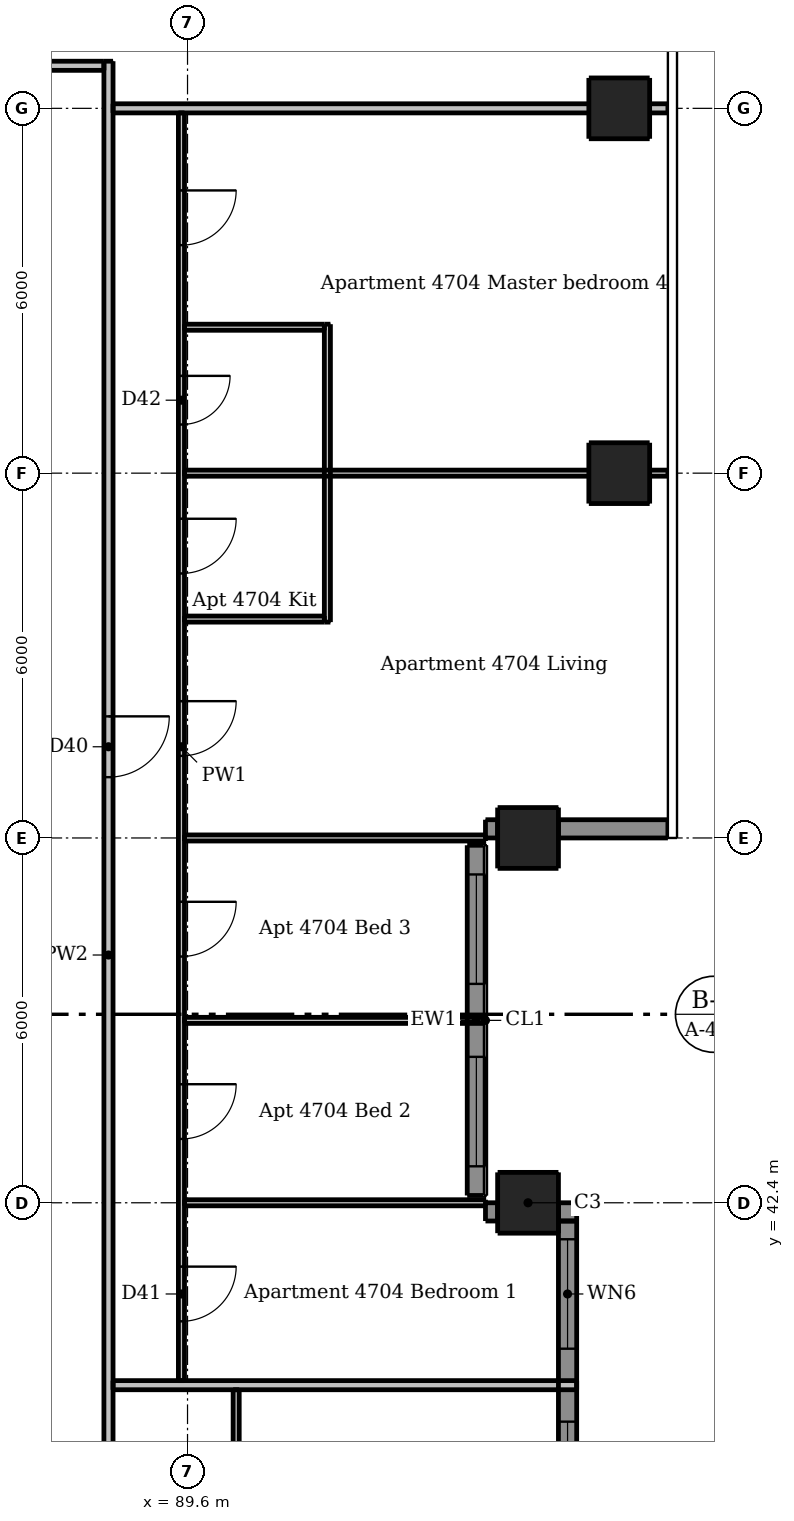
"""IFC4 building model, lengths in metres.
Left out: names, types, materials, properties, quantities, classifications, styles, units other than length and angle.
Written with IfcOpenShell. Run it as: python <this file> out.ifc"""

import sys

from ifc_helpers import new_model, si_unit, direction, frame, frame_2d, origin, origin_2d, place, context, subcontext, project, spatial, rectangle, extrude, element, fill, save


model = new_model("IFC4")
c1 = context("Model", 3, precision=1e-05, world=origin(), true_north=direction((0.0, 1.0)))
c2 = subcontext(c1, "Body", "Model", "MODEL_VIEW")
j1 = project(units=[si_unit("LENGTHUNIT", "METRE"), si_unit("PLANEANGLEUNIT", "RADIAN")], contexts=[c1])
p1 = place(None, origin())
s1 = spatial("IfcSite", under=j1, at=p1, CompositionType="ELEMENT")
p2 = place(p1, origin())
s2 = spatial("IfcBuilding", under=s1, at=p2, CompositionType="ELEMENT")
p3 = place(p2, frame((0.0, 0.0, 174.7)))
s3 = spatial("IfcBuildingStorey", under=s2, at=p3, CompositionType="ELEMENT", Elevation=174.7)
for number, where, z_axis, x_axis in (
    (1, (95.2, 42.4, 0.0), (0.0, 0.0, 1.0), (1.0, 0.0, 0.0)),
    (2, (95.2, 48.4, 0.0), (0.0, 0.0, 1.0), (1.0, 0.0, 0.0)),
    (3, (96.7, 54.4, 0.0), (0.0, 0.0, 1.0), (1.0, 0.0, 0.0)),
    (4, (96.7, 60.4, 0.0), (0.0, 0.0, 1.0), (1.0, 0.0, 0.0)),
):
    element("IfcColumn", number, at=place(p3, frame(where, z_axis=z_axis, x_axis=x_axis)), inside=s3, PredefinedType="COLUMN", context=c2, shape_type="SweptSolid", body=[
        extrude(rectangle(XDim=1.0, YDim=1.0, at=origin_2d()), origin(), (0.0, 0.0, 1.0), 2.95),
    ])
p4 = place(p3, frame((96.0, 42.25, 0.0), z_axis=(0.0, 0.0, 1.0), x_axis=(-1.0, 0.0, 0.0)))
e5 = element("IfcWall", 5, at=p4, inside=s3, PredefinedType="SOLIDWALL", context=c2, shape_type="SweptSolid", body=[
    extrude(rectangle(XDim=0.3, YDim=0.3, at=frame_2d((0.15, 0.0))), origin(), (0.0, 0.0, 1.0), 2.95),
])
for number, where, z_axis, x_axis in (
    (6, (94.7, 42.25, 0.0), (0.0, 0.0, 1.0), (-1.0, 0.0, 0.0)),
    (7, (94.5, 48.55, 0.0), (0.0, 0.0, 1.0), (1.0, 0.0, 0.0)),
):
    element("IfcWall", number, at=place(p3, frame(where, z_axis=z_axis, x_axis=x_axis)), inside=s3, PredefinedType="SOLIDWALL", context=c2, shape_type="SweptSolid", body=[
        extrude(rectangle(XDim=0.2, YDim=0.3, at=frame_2d((0.1, 0.0))), origin(), (0.0, 0.0, 1.0), 2.95),
    ])
p5 = place(p3, frame((95.7, 48.55, 0.0), z_axis=(0.0, 0.0, 1.0), x_axis=(1.0, 0.0, 0.0)))
e8 = element("IfcWall", 8, at=p5, inside=s3, PredefinedType="SOLIDWALL", context=c2, shape_type="SweptSolid", body=[
    extrude(rectangle(XDim=1.8, YDim=0.3, at=frame_2d((0.9, 0.0))), origin(), (0.0, 0.0, 1.0), 2.95),
])
p6 = place(p3, frame((95.85, 36.4, 0.0), z_axis=(0.0, 0.0, 1.0), x_axis=(0.0, 1.0, 0.0)))
e9 = element("IfcWall", 9, at=p6, inside=s3, PredefinedType="SOLIDWALL", context=c2, shape_type="SweptSolid", body=[
    extrude(rectangle(XDim=5.7, YDim=0.3, at=frame_2d((2.85, 0.0))), origin(), (0.0, 0.0, 1.0), 2.34),
])
p7 = place(p6, frame((0.6, 0.0, 0.15)))
e10 = element("IfcOpeningElement", 10, at=p7, cuts=e9, PredefinedType="OPENING", context=c2, shape_type="SweptSolid", body=[
    extrude(rectangle(XDim=1.8, YDim=2.1, at=frame_2d((0.9, 1.05))), frame((0.0, 0.16, 0.0), z_axis=(0.0, -1.0, 0.0), x_axis=(1.0, 0.0, 0.0)), (0.0, 0.0, 1.0), 0.32),
])
p8 = place(p6, frame((3.6, 0.0, 0.15)))
e11 = element("IfcOpeningElement", 11, at=p8, cuts=e9, PredefinedType="OPENING", context=c2, shape_type="SweptSolid", body=[
    extrude(rectangle(XDim=1.8, YDim=2.1, at=frame_2d((0.9, 1.05))), frame((0.0, 0.16, 0.0), z_axis=(0.0, -1.0, 0.0), x_axis=(1.0, 0.0, 0.0)), (0.0, 0.0, 1.0), 0.32),
])
p9 = place(p3, frame((94.35, 42.52, 0.0), z_axis=(0.0, 0.0, 1.0), x_axis=(0.0, 1.0, 0.0)))
e12 = element("IfcWall", 12, at=p9, inside=s3, PredefinedType="SOLIDWALL", context=c2, shape_type="SweptSolid", body=[
    extrude(rectangle(XDim=5.76, YDim=0.3, at=frame_2d((2.88, 0.0))), origin(), (0.0, 0.0, 1.0), 2.95),
])
p10 = place(p9, frame((0.48, 0.0, 0.15)))
e13 = element("IfcOpeningElement", 13, at=p10, cuts=e12, PredefinedType="OPENING", context=c2, shape_type="SweptSolid", body=[
    extrude(rectangle(XDim=1.8, YDim=2.1, at=frame_2d((0.9, 1.05))), frame((0.0, 0.16, 0.0), z_axis=(0.0, -1.0, 0.0), x_axis=(1.0, 0.0, 0.0)), (0.0, 0.0, 1.0), 0.32),
])
p11 = place(p9, frame((3.48, 0.0, 0.15)))
e14 = element("IfcOpeningElement", 14, at=p11, cuts=e12, PredefinedType="OPENING", context=c2, shape_type="SweptSolid", body=[
    extrude(rectangle(XDim=1.8, YDim=2.1, at=frame_2d((0.9, 1.05))), frame((0.0, 0.16, 0.0), z_axis=(0.0, -1.0, 0.0), x_axis=(1.0, 0.0, 0.0)), (0.0, 0.0, 1.0), 0.32),
])
p12 = place(p3, frame((89.5, 60.325, 0.0), z_axis=(0.0, 0.0, 1.0), x_axis=(0.0, -1.0, 0.0)))
e15 = element("IfcWall", 15, at=p12, inside=s3, PredefinedType="PARTITIONING", context=c2, shape_type="SweptSolid", body=[
    extrude(rectangle(XDim=20.85, YDim=0.1, at=frame_2d((10.425, 0.0))), origin(), (0.0, 0.0, 1.0), 2.332),
])
p13 = place(p12, frame((9.675, 0.0, 0.0)))
e16 = element("IfcOpeningElement", 16, at=p13, cuts=e15, PredefinedType="OPENING", context=c2, shape_type="SweptSolid", body=[
    extrude(rectangle(XDim=0.9, YDim=2.1, at=frame_2d((0.45, 1.05))), frame((0.0, 0.06, 0.0), z_axis=(0.0, -1.0, 0.0), x_axis=(1.0, 0.0, 0.0)), (0.0, 0.0, 1.0), 0.12),
])
p14 = place(p12, frame((6.675, 0.0, 0.0)))
e17 = element("IfcOpeningElement", 17, at=p14, cuts=e15, PredefinedType="OPENING", context=c2, shape_type="SweptSolid", body=[
    extrude(rectangle(XDim=0.9, YDim=2.1, at=frame_2d((0.45, 1.05))), frame((0.0, 0.06, 0.0), z_axis=(0.0, -1.0, 0.0), x_axis=(1.0, 0.0, 0.0)), (0.0, 0.0, 1.0), 0.12),
])
p15 = place(p12, frame((18.975, 0.0, 0.0)))
e18 = element("IfcOpeningElement", 18, at=p15, cuts=e15, PredefinedType="OPENING", context=c2, shape_type="SweptSolid", body=[
    extrude(rectangle(XDim=0.9, YDim=2.1, at=frame_2d((0.45, 1.05))), frame((0.0, 0.06, 0.0), z_axis=(0.0, -1.0, 0.0), x_axis=(1.0, 0.0, 0.0)), (0.0, 0.0, 1.0), 0.12),
])
p16 = place(p12, frame((15.975, 0.0, 0.0)))
e19 = element("IfcOpeningElement", 19, at=p16, cuts=e15, PredefinedType="OPENING", context=c2, shape_type="SweptSolid", body=[
    extrude(rectangle(XDim=0.9, YDim=2.1, at=frame_2d((0.45, 1.05))), frame((0.0, 0.06, 0.0), z_axis=(0.0, -1.0, 0.0), x_axis=(1.0, 0.0, 0.0)), (0.0, 0.0, 1.0), 0.12),
])
p17 = place(p12, frame((12.975, 0.0, 0.0)))
e20 = element("IfcOpeningElement", 20, at=p17, cuts=e15, PredefinedType="OPENING", context=c2, shape_type="SweptSolid", body=[
    extrude(rectangle(XDim=0.9, YDim=2.1, at=frame_2d((0.45, 1.05))), frame((0.0, 0.06, 0.0), z_axis=(0.0, -1.0, 0.0), x_axis=(1.0, 0.0, 0.0)), (0.0, 0.0, 1.0), 0.12),
])
p18 = place(p12, frame((1.275, 0.0, 0.0)))
e21 = element("IfcOpeningElement", 21, at=p18, cuts=e15, PredefinedType="OPENING", context=c2, shape_type="SweptSolid", body=[
    extrude(rectangle(XDim=0.9, YDim=2.1, at=frame_2d((0.45, 1.05))), frame((0.0, 0.06, 0.0), z_axis=(0.0, -1.0, 0.0), x_axis=(1.0, 0.0, 0.0)), (0.0, 0.0, 1.0), 0.12),
])
p19 = place(p12, frame((4.325, 0.0, 0.0)))
e22 = element("IfcOpeningElement", 22, at=p19, cuts=e15, PredefinedType="OPENING", context=c2, shape_type="SweptSolid", body=[
    extrude(rectangle(XDim=0.8, YDim=2.1, at=frame_2d((0.4, 1.05))), frame((0.0, 0.06, 0.0), z_axis=(0.0, -1.0, 0.0), x_axis=(1.0, 0.0, 0.0)), (0.0, 0.0, 1.0), 0.12),
])
p20 = place(p3, frame((90.4, 33.45, 0.0), z_axis=(0.0, 0.0, 1.0), x_axis=(0.0, 1.0, 0.0)))
e23 = element("IfcWall", 23, at=p20, inside=s3, PredefinedType="PARTITIONING", context=c2, shape_type="SweptSolid", body=[
    extrude(rectangle(XDim=5.875, YDim=0.1, at=frame_2d((2.938, 0.0))), origin(), (0.0, 0.0, 1.0), 2.95),
])
p21 = place(p20, frame((3.75, 0.0, 0.0)))
e24 = element("IfcOpeningElement", 24, at=p21, cuts=e23, PredefinedType="OPENING", context=c2, shape_type="SweptSolid", body=[
    extrude(rectangle(XDim=0.8, YDim=2.1, at=frame_2d((0.4, 1.05))), frame((0.0, 0.06, 0.0), z_axis=(0.0, -1.0, 0.0), x_axis=(1.0, 0.0, 0.0)), (0.0, 0.0, 1.0), 0.12),
])
p22 = place(p3, frame((91.9, 51.95, 0.0), z_axis=(0.0, 0.0, 1.0), x_axis=(0.0, 1.0, 0.0)))
e25 = element("IfcWall", 25, at=p22, inside=s3, PredefinedType="PARTITIONING", context=c2, shape_type="SweptSolid", body=[
    extrude(rectangle(XDim=4.9, YDim=0.1, at=frame_2d((2.45, 0.0))), origin(), (0.0, 0.0, 1.0), 2.95),
])
p23 = place(p3, frame((89.55, 56.8, 0.0), z_axis=(0.0, 0.0, 1.0), x_axis=(1.0, 0.0, 0.0)))
e26 = element("IfcWall", 26, at=p23, inside=s3, PredefinedType="PARTITIONING", context=c2, shape_type="SweptSolid", body=[
    extrude(rectangle(XDim=2.3, YDim=0.1, at=frame_2d((1.15, 0.0))), origin(), (0.0, 0.0, 1.0), 2.95),
])
p24 = place(p3, frame((89.55, 54.4, 0.0), z_axis=(0.0, 0.0, 1.0), x_axis=(1.0, 0.0, 0.0)))
e27 = element("IfcWall", 27, at=p24, inside=s3, PredefinedType="PARTITIONING", context=c2, shape_type="SweptSolid", body=[
    extrude(rectangle(XDim=7.95, YDim=0.1, at=frame_2d((3.975, 0.0))), origin(), (0.0, 0.0, 1.0), 2.332),
])
p25 = place(p3, frame((89.55, 52.0, 0.0), z_axis=(0.0, 0.0, 1.0), x_axis=(1.0, 0.0, 0.0)))
e28 = element("IfcWall", 28, at=p25, inside=s3, PredefinedType="PARTITIONING", context=c2, shape_type="SweptSolid", body=[
    extrude(rectangle(XDim=2.3, YDim=0.1, at=frame_2d((1.15, 0.0))), origin(), (0.0, 0.0, 1.0), 2.95),
])
p26 = place(p3, frame((89.55, 48.4, 0.0), z_axis=(0.0, 0.0, 1.0), x_axis=(1.0, 0.0, 0.0)))
e29 = element("IfcWall", 29, at=p26, inside=s3, PredefinedType="PARTITIONING", context=c2, shape_type="SweptSolid", body=[
    extrude(rectangle(XDim=4.95, YDim=0.1, at=frame_2d((2.475, 0.0))), origin(), (0.0, 0.0, 1.0), 2.332),
])
p27 = place(p3, frame((89.55, 45.4, 0.0), z_axis=(0.0, 0.0, 1.0), x_axis=(1.0, 0.0, 0.0)))
e30 = element("IfcWall", 30, at=p27, inside=s3, PredefinedType="PARTITIONING", context=c2, shape_type="SweptSolid", body=[
    extrude(rectangle(XDim=4.95, YDim=0.1, at=frame_2d((2.475, 0.0))), origin(), (0.0, 0.0, 1.0), 2.95),
])
p28 = place(p3, frame((89.55, 42.4, 0.0), z_axis=(0.0, 0.0, 1.0), x_axis=(1.0, 0.0, 0.0)))
e31 = element("IfcWall", 31, at=p28, inside=s3, PredefinedType="PARTITIONING", context=c2, shape_type="SweptSolid", body=[
    extrude(rectangle(XDim=4.95, YDim=0.1, at=frame_2d((2.475, 0.0))), origin(), (0.0, 0.0, 1.0), 2.332),
])
p29 = place(p3, frame((88.3, 61.175, 0.0), z_axis=(0.0, 0.0, 1.0), x_axis=(0.0, -1.0, 0.0)))
e32 = element("IfcWall", 32, at=p29, inside=s3, PredefinedType="PARTITIONING", context=c2, shape_type="SweptSolid", body=[
    extrude(rectangle(XDim=29.4, YDim=0.15, at=frame_2d((14.7, 0.0))), origin(), (0.0, 0.0, 1.0), 2.95),
])
p30 = place(p29, frame((28.125, 0.0, 0.0)))
e33 = element("IfcOpeningElement", 33, at=p30, cuts=e32, PredefinedType="OPENING", context=c2, shape_type="SweptSolid", body=[
    extrude(rectangle(XDim=1.0, YDim=2.1, at=frame_2d((0.5, 1.05))), frame((0.0, 0.085, 0.0), z_axis=(0.0, -1.0, 0.0), x_axis=(1.0, 0.0, 0.0)), (0.0, 0.0, 1.0), 0.17),
])
p31 = place(p29, frame((10.775, 0.0, 0.0)))
e34 = element("IfcOpeningElement", 34, at=p31, cuts=e32, PredefinedType="OPENING", context=c2, shape_type="SweptSolid", body=[
    extrude(rectangle(XDim=1.0, YDim=2.1, at=frame_2d((0.5, 1.05))), frame((0.0, 0.085, 0.0), z_axis=(0.0, -1.0, 0.0), x_axis=(1.0, 0.0, 0.0)), (0.0, 0.0, 1.0), 0.17),
])
p32 = place(p3, frame((58.975, 61.1, 0.0), z_axis=(0.0, 0.0, 1.0), x_axis=(1.0, 0.0, 0.0)))
e35 = element("IfcWall", 35, at=p32, inside=s3, PredefinedType="PARTITIONING", context=c2, shape_type="SweptSolid", body=[
    extrude(rectangle(XDim=29.25, YDim=0.15, at=frame_2d((14.625, 0.0))), origin(), (0.0, 0.0, 1.0), 2.95),
])
p33 = place(p32, frame((9.125, 0.0, 0.0)))
e36 = element("IfcOpeningElement", 36, at=p33, cuts=e35, PredefinedType="OPENING", context=c2, shape_type="SweptSolid", body=[
    extrude(rectangle(XDim=1.0, YDim=2.1, at=frame_2d((0.5, 1.05))), frame((0.0, 0.085, 0.0), z_axis=(0.0, -1.0, 0.0), x_axis=(1.0, 0.0, 0.0)), (0.0, 0.0, 1.0), 0.17),
])
p34 = place(p32, frame((26.475, 0.0, 0.0)))
e37 = element("IfcOpeningElement", 37, at=p34, cuts=e35, PredefinedType="OPENING", context=c2, shape_type="SweptSolid", body=[
    extrude(rectangle(XDim=1.0, YDim=2.1, at=frame_2d((0.5, 1.05))), frame((0.0, 0.085, 0.0), z_axis=(0.0, -1.0, 0.0), x_axis=(1.0, 0.0, 0.0)), (0.0, 0.0, 1.0), 0.17),
])
p35 = place(p3, frame((88.375, 60.4, 0.0), z_axis=(0.0, 0.0, 1.0), x_axis=(1.0, 0.0, 0.0)))
e38 = element("IfcWall", 38, at=p35, inside=s3, PredefinedType="PARTITIONING", context=c2, shape_type="SweptSolid", body=[
    extrude(rectangle(XDim=9.125, YDim=0.15, at=frame_2d((4.562, 0.0))), origin(), (0.0, 0.0, 1.0), 2.332),
])
p36 = place(p3, frame((88.375, 39.4, 0.0), z_axis=(0.0, 0.0, 1.0), x_axis=(1.0, 0.0, 0.0)))
e39 = element("IfcWall", 39, at=p36, inside=s3, PredefinedType="PARTITIONING", context=c2, shape_type="SweptSolid", body=[
    extrude(rectangle(XDim=7.625, YDim=0.15, at=frame_2d((3.812, 0.0))), origin(), (0.0, 0.0, 1.0), 2.95),
])
p37 = place(p7, origin())
e40 = element("IfcWindow", 40, at=p37, inside=s3, PartitioningType="DOUBLE_PANEL_VERTICAL", PredefinedType="WINDOW", context=c2, shape_type="SweptSolid", body=[
    extrude(rectangle(XDim=1.8, YDim=2.1, at=frame_2d((0.9, 1.05))), frame((0.0, 0.03, 0.0), z_axis=(0.0, -1.0, 0.0), x_axis=(1.0, 0.0, 0.0)), (0.0, 0.0, 1.0), 0.06),
])
fill(e10, e40)
p38 = place(p8, origin())
e41 = element("IfcWindow", 41, at=p38, inside=s3, PartitioningType="DOUBLE_PANEL_VERTICAL", PredefinedType="WINDOW", context=c2, shape_type="SweptSolid", body=[
    extrude(rectangle(XDim=1.8, YDim=2.1, at=frame_2d((0.9, 1.05))), frame((0.0, 0.03, 0.0), z_axis=(0.0, -1.0, 0.0), x_axis=(1.0, 0.0, 0.0)), (0.0, 0.0, 1.0), 0.06),
])
fill(e11, e41)
p39 = place(p10, origin())
e42 = element("IfcWindow", 42, at=p39, inside=s3, PartitioningType="DOUBLE_PANEL_VERTICAL", PredefinedType="WINDOW", context=c2, shape_type="SweptSolid", body=[
    extrude(rectangle(XDim=1.8, YDim=2.1, at=frame_2d((0.9, 1.05))), frame((0.0, 0.03, 0.0), z_axis=(0.0, -1.0, 0.0), x_axis=(1.0, 0.0, 0.0)), (0.0, 0.0, 1.0), 0.06),
])
fill(e13, e42)
p40 = place(p11, origin())
e43 = element("IfcWindow", 43, at=p40, inside=s3, PartitioningType="DOUBLE_PANEL_VERTICAL", PredefinedType="WINDOW", context=c2, shape_type="SweptSolid", body=[
    extrude(rectangle(XDim=1.8, YDim=2.1, at=frame_2d((0.9, 1.05))), frame((0.0, 0.03, 0.0), z_axis=(0.0, -1.0, 0.0), x_axis=(1.0, 0.0, 0.0)), (0.0, 0.0, 1.0), 0.06),
])
fill(e14, e43)
p41 = place(p31, origin())
e44 = element("IfcDoor", 44, at=p41, inside=s3, OperationType="SINGLE_SWING_LEFT", PredefinedType="DOOR", context=c2, shape_type="SweptSolid", body=[
    extrude(rectangle(XDim=1.0, YDim=2.1, at=frame_2d((0.5, 1.05))), frame((0.0, 0.025, 0.0), z_axis=(0.0, -1.0, 0.0), x_axis=(1.0, 0.0, 0.0)), (0.0, 0.0, 1.0), 0.05),
])
fill(e34, e44)
p42 = place(p13, origin())
e45 = element("IfcDoor", 45, at=p42, inside=s3, OperationType="SINGLE_SWING_LEFT", PredefinedType="DOOR", context=c2, shape_type="SweptSolid", body=[
    extrude(rectangle(XDim=0.9, YDim=2.1, at=frame_2d((0.45, 1.05))), frame((0.0, 0.025, 0.0), z_axis=(0.0, -1.0, 0.0), x_axis=(1.0, 0.0, 0.0)), (0.0, 0.0, 1.0), 0.05),
])
fill(e16, e45)
p43 = place(p14, origin())
e46 = element("IfcDoor", 46, at=p43, inside=s3, OperationType="SINGLE_SWING_LEFT", PredefinedType="DOOR", context=c2, shape_type="SweptSolid", body=[
    extrude(rectangle(XDim=0.9, YDim=2.1, at=frame_2d((0.45, 1.05))), frame((0.0, 0.025, 0.0), z_axis=(0.0, -1.0, 0.0), x_axis=(1.0, 0.0, 0.0)), (0.0, 0.0, 1.0), 0.05),
])
fill(e17, e46)
p44 = place(p15, origin())
e47 = element("IfcDoor", 47, at=p44, inside=s3, OperationType="SINGLE_SWING_LEFT", PredefinedType="DOOR", context=c2, shape_type="SweptSolid", body=[
    extrude(rectangle(XDim=0.9, YDim=2.1, at=frame_2d((0.45, 1.05))), frame((0.0, 0.025, 0.0), z_axis=(0.0, -1.0, 0.0), x_axis=(1.0, 0.0, 0.0)), (0.0, 0.0, 1.0), 0.05),
])
fill(e18, e47)
p45 = place(p16, origin())
e48 = element("IfcDoor", 48, at=p45, inside=s3, OperationType="SINGLE_SWING_LEFT", PredefinedType="DOOR", context=c2, shape_type="SweptSolid", body=[
    extrude(rectangle(XDim=0.9, YDim=2.1, at=frame_2d((0.45, 1.05))), frame((0.0, 0.025, 0.0), z_axis=(0.0, -1.0, 0.0), x_axis=(1.0, 0.0, 0.0)), (0.0, 0.0, 1.0), 0.05),
])
fill(e19, e48)
p46 = place(p17, origin())
e49 = element("IfcDoor", 49, at=p46, inside=s3, OperationType="SINGLE_SWING_LEFT", PredefinedType="DOOR", context=c2, shape_type="SweptSolid", body=[
    extrude(rectangle(XDim=0.9, YDim=2.1, at=frame_2d((0.45, 1.05))), frame((0.0, 0.025, 0.0), z_axis=(0.0, -1.0, 0.0), x_axis=(1.0, 0.0, 0.0)), (0.0, 0.0, 1.0), 0.05),
])
fill(e20, e49)
p47 = place(p18, origin())
e50 = element("IfcDoor", 50, at=p47, inside=s3, OperationType="SINGLE_SWING_LEFT", PredefinedType="DOOR", context=c2, shape_type="SweptSolid", body=[
    extrude(rectangle(XDim=0.9, YDim=2.1, at=frame_2d((0.45, 1.05))), frame((0.0, 0.025, 0.0), z_axis=(0.0, -1.0, 0.0), x_axis=(1.0, 0.0, 0.0)), (0.0, 0.0, 1.0), 0.05),
])
fill(e21, e50)
p48 = place(p19, origin())
e51 = element("IfcDoor", 51, at=p48, inside=s3, OperationType="SINGLE_SWING_LEFT", PredefinedType="DOOR", context=c2, shape_type="SweptSolid", body=[
    extrude(rectangle(XDim=0.8, YDim=2.1, at=frame_2d((0.4, 1.05))), frame((0.0, 0.025, 0.0), z_axis=(0.0, -1.0, 0.0), x_axis=(1.0, 0.0, 0.0)), (0.0, 0.0, 1.0), 0.05),
])
fill(e22, e51)
save(model, sys.argv[1])
